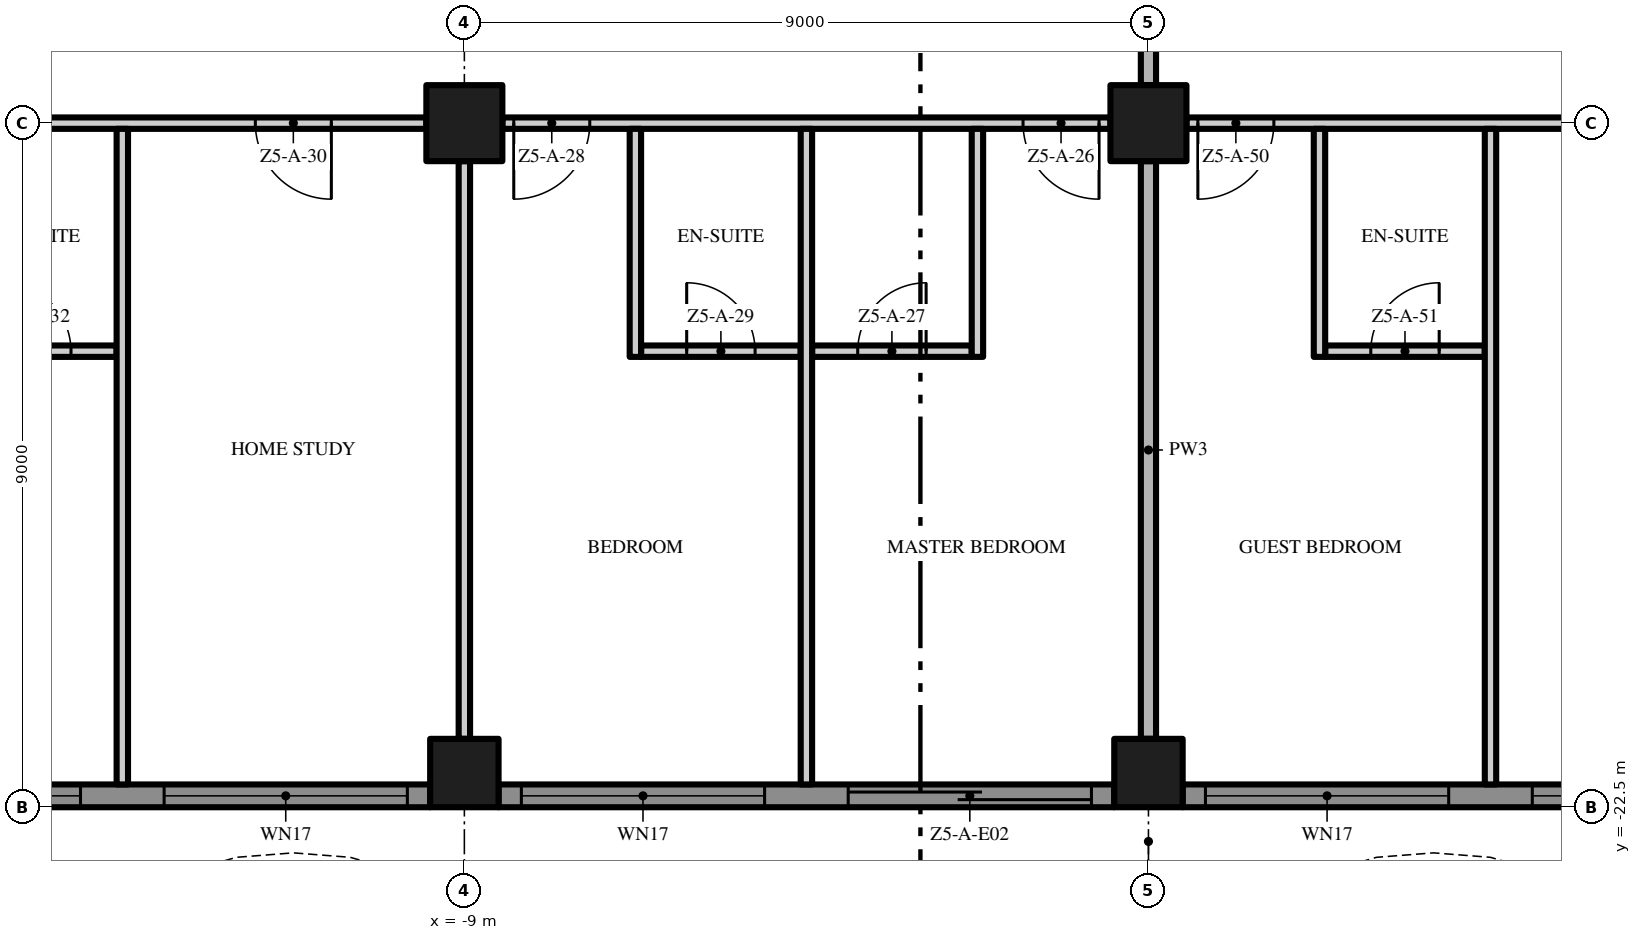
"""IFC4 building model, lengths in metres.
Left out: names, types, materials, properties, quantities, classifications, styles, units other than length and angle.
Written with IfcOpenShell. Run it as: python <this file> out.ifc"""

import sys

from ifc_helpers import new_model, si_unit, direction, frame, frame_2d, origin, origin_2d, place, context, subcontext, project, spatial, polyline, rectangle, outline, extrude, element, fill, save


model = new_model("IFC4")
c1 = context("Model", 3, precision=1e-05, world=origin(), true_north=direction((0.0, 1.0)))
c2 = subcontext(c1, "Body", "Model", "MODEL_VIEW")
j1 = project(units=[si_unit("LENGTHUNIT", "METRE"), si_unit("PLANEANGLEUNIT", "RADIAN")], contexts=[c1])
p1 = place(None, origin())
s1 = spatial("IfcSite", under=j1, at=p1, CompositionType="ELEMENT")
p2 = place(p1, origin())
s2 = spatial("IfcBuilding", under=s1, at=p2, CompositionType="ELEMENT")
p3 = place(p2, frame((0.0, 0.0, 242.6)))
s3 = spatial("IfcBuildingStorey", under=s2, at=p3, CompositionType="ELEMENT", Elevation=242.6)
p4 = place(p3, frame((-9.0, -13.5, 0.0), z_axis=(0.0, 0.0, 1.0), x_axis=(1.0, 0.0, 0.0)))
e1 = element("IfcColumn", 1, at=p4, inside=s3, PredefinedType="COLUMN", context=c2, shape_type="SweptSolid", body=[
    extrude(rectangle(XDim=1.0, YDim=1.0, at=origin_2d()), origin(), (0.0, 0.0, 1.0), 3.5),
])
p5 = place(p3, frame((-9.0, -22.05, 0.0), z_axis=(0.0, 0.0, 1.0), x_axis=(1.0, 0.0, 0.0)))
e2 = element("IfcColumn", 2, at=p5, inside=s3, PredefinedType="COLUMN", context=c2, shape_type="SweptSolid", body=[
    extrude(rectangle(XDim=0.9, YDim=0.9, at=origin_2d()), origin(), (0.0, 0.0, 1.0), 3.5),
])
p6 = place(p3, frame((0.0, -13.5, 0.0), z_axis=(0.0, 0.0, 1.0), x_axis=(1.0, 0.0, 0.0)))
e3 = element("IfcColumn", 3, at=p6, inside=s3, PredefinedType="COLUMN", context=c2, shape_type="SweptSolid", body=[
    extrude(rectangle(XDim=1.0, YDim=1.0, at=origin_2d()), origin(), (0.0, 0.0, 1.0), 3.5),
])
p7 = place(p3, frame((0.0, -22.05, 0.0), z_axis=(0.0, 0.0, 1.0), x_axis=(1.0, 0.0, 0.0)))
e4 = element("IfcColumn", 4, at=p7, inside=s3, PredefinedType="COLUMN", context=c2, shape_type="SweptSolid", body=[
    extrude(rectangle(XDim=0.9, YDim=0.9, at=origin_2d()), origin(), (0.0, 0.0, 1.0), 3.5),
])
p8 = place(p3, frame((-9.45, -22.35, 0.0), z_axis=(0.0, 0.0, 1.0), x_axis=(-1.0, 0.0, 0.0)))
e5 = element("IfcWall", 5, at=p8, inside=s3, PredefinedType="SOLIDWALL", context=c2, shape_type="SweptSolid", body=[
    extrude(rectangle(XDim=8.1, YDim=0.3, at=frame_2d((4.05, 0.0))), origin(), (0.0, 0.0, 1.0), 3.5),
])
p9 = place(p8, frame((4.6, 0.0, 0.45)))
e6 = element("IfcOpeningElement", 6, at=p9, cuts=e5, PredefinedType="OPENING", context=c2, shape_type="SweptSolid", body=[
    extrude(rectangle(XDim=3.2, YDim=2.65, at=frame_2d((1.6, 1.325))), frame((0.0, 0.16, 0.0), z_axis=(0.0, -1.0, 0.0), x_axis=(1.0, 0.0, 0.0)), (0.0, 0.0, 1.0), 0.32),
])
p10 = place(p8, frame((0.3, 0.0, 0.45)))
e7 = element("IfcOpeningElement", 7, at=p10, cuts=e5, PredefinedType="OPENING", context=c2, shape_type="SweptSolid", body=[
    extrude(rectangle(XDim=3.2, YDim=2.65, at=frame_2d((1.6, 1.325))), frame((0.0, 0.16, 0.0), z_axis=(0.0, -1.0, 0.0), x_axis=(1.0, 0.0, 0.0)), (0.0, 0.0, 1.0), 0.32),
])
p11 = place(p3, frame((-0.45, -22.35, 0.0), z_axis=(0.0, 0.0, 1.0), x_axis=(-1.0, 0.0, 0.0)))
e8 = element("IfcWall", 8, at=p11, inside=s3, PredefinedType="SOLIDWALL", context=c2, shape_type="SweptSolid", body=[
    extrude(rectangle(XDim=8.1, YDim=0.3, at=frame_2d((4.05, 0.0))), origin(), (0.0, 0.0, 1.0), 3.5),
])
p12 = place(p11, frame((4.6, 0.0, 0.45)))
e9 = element("IfcOpeningElement", 9, at=p12, cuts=e8, PredefinedType="OPENING", context=c2, shape_type="SweptSolid", body=[
    extrude(rectangle(XDim=3.2, YDim=2.65, at=frame_2d((1.6, 1.325))), frame((0.0, 0.16, 0.0), z_axis=(0.0, -1.0, 0.0), x_axis=(1.0, 0.0, 0.0)), (0.0, 0.0, 1.0), 0.32),
])
p13 = place(p11, frame((0.3, 0.0, 0.0)))
e10 = element("IfcOpeningElement", 10, at=p13, cuts=e8, PredefinedType="OPENING", context=c2, shape_type="SweptSolid", body=[
    extrude(rectangle(XDim=3.2, YDim=2.4, at=frame_2d((1.6, 1.2))), frame((0.0, 0.16, 0.0), z_axis=(0.0, -1.0, 0.0), x_axis=(1.0, 0.0, 0.0)), (0.0, 0.0, 1.0), 0.32),
])
p14 = place(p3, frame((8.55, -22.35, 0.0), z_axis=(0.0, 0.0, 1.0), x_axis=(-1.0, 0.0, 0.0)))
e11 = element("IfcWall", 11, at=p14, inside=s3, PredefinedType="SOLIDWALL", context=c2, shape_type="SweptSolid", body=[
    extrude(rectangle(XDim=8.1, YDim=0.3, at=frame_2d((4.05, 0.0))), origin(), (0.0, 0.0, 1.0), 3.5),
])
p15 = place(p14, frame((4.6, 0.0, 0.45)))
e12 = element("IfcOpeningElement", 12, at=p15, cuts=e11, PredefinedType="OPENING", context=c2, shape_type="SweptSolid", body=[
    extrude(rectangle(XDim=3.2, YDim=2.65, at=frame_2d((1.6, 1.325))), frame((0.0, 0.16, 0.0), z_axis=(0.0, -1.0, 0.0), x_axis=(1.0, 0.0, 0.0)), (0.0, 0.0, 1.0), 0.32),
])
p16 = place(p14, frame((0.3, 0.0, 0.45)))
e13 = element("IfcOpeningElement", 13, at=p16, cuts=e11, PredefinedType="OPENING", context=c2, shape_type="SweptSolid", body=[
    extrude(rectangle(XDim=3.2, YDim=2.65, at=frame_2d((1.6, 1.325))), frame((0.0, 0.16, 0.0), z_axis=(0.0, -1.0, 0.0), x_axis=(1.0, 0.0, 0.0)), (0.0, 0.0, 1.0), 0.32),
])
p17 = place(p3, origin())
e14 = element("IfcWall", 14, at=p17, inside=s3, PredefinedType="USERDEFINED", context=c2, shape_type="SweptSolid", body=[
    extrude(outline(polyline([(-22.5, -24.3), (-21.0, -25.005), (-19.5, -25.441), (-18.75, -25.5), (-18.0, -25.441), (-16.5, -25.005), (-15.0, -24.3), (-13.5, -23.595), (-12.0, -23.159), (-11.25, -23.1), (-10.5, -23.159), (-9.0, -23.595), (-7.5, -24.3), (-6.0, -25.005), (-4.5, -25.441), (-3.75, -25.5), (-3.0, -25.441), (-1.5, -25.005), (0.0, -24.3), (1.5, -23.595), (3.0, -23.159), (3.75, -23.1), (4.5, -23.159), (6.0, -23.595), (7.5, -24.3), (9.0, -25.005), (10.5, -25.441), (11.25, -25.5), (12.0, -25.441), (13.5, -25.005), (15.0, -24.3), (16.5, -23.595), (18.0, -23.159), (18.75, -23.1), (19.5, -23.159), (21.0, -23.595), (22.5, -24.3), (22.606, -24.074), (21.089, -23.36), (19.545, -22.911), (18.75, -22.849), (17.955, -22.911), (16.411, -23.36), (14.894, -24.074), (13.411, -24.771), (11.955, -25.194), (11.25, -25.249), (10.545, -25.194), (9.089, -24.771), (7.606, -24.074), (6.089, -23.36), (4.545, -22.911), (3.75, -22.849), (2.955, -22.911), (1.411, -23.36), (-0.106, -24.074), (-1.589, -24.771), (-3.045, -25.194), (-3.75, -25.249), (-4.455, -25.194), (-5.911, -24.771), (-7.394, -24.074), (-8.911, -23.36), (-10.455, -22.911), (-11.25, -22.849), (-12.045, -22.911), (-13.589, -23.36), (-15.106, -24.074), (-16.589, -24.771), (-18.045, -25.194), (-18.75, -25.249), (-19.455, -25.194), (-20.911, -24.771), (-22.394, -24.074), (-22.5, -24.3)])), origin(), (0.0, 0.0, 1.0), 0.9),
])
p18 = place(p3, frame((-15.675, -16.5, 0.0), z_axis=(0.0, 0.0, 1.0), x_axis=(1.0, 0.0, 0.0)))
e15 = element("IfcWall", 15, at=p18, inside=s3, PredefinedType="PARTITIONING", context=c2, shape_type="SweptSolid", body=[
    extrude(rectangle(XDim=2.1, YDim=0.15, at=frame_2d((1.05, 0.0))), origin(), (0.0, 0.0, 1.0), 3.5),
])
p19 = place(p18, frame((0.6, 0.0, 0.0)))
e16 = element("IfcOpeningElement", 16, at=p19, cuts=e15, PredefinedType="OPENING", context=c2, shape_type="SweptSolid", body=[
    extrude(rectangle(XDim=0.9, YDim=2.1, at=frame_2d((0.45, 1.05))), frame((0.0, 0.085, 0.0), z_axis=(0.0, -1.0, 0.0), x_axis=(1.0, 0.0, 0.0)), (0.0, 0.0, 1.0), 0.17),
])
p20 = place(p3, frame((-6.675, -16.5, 0.0), z_axis=(0.0, 0.0, 1.0), x_axis=(1.0, 0.0, 0.0)))
e17 = element("IfcWall", 17, at=p20, inside=s3, PredefinedType="PARTITIONING", context=c2, shape_type="SweptSolid", body=[
    extrude(rectangle(XDim=2.1, YDim=0.15, at=frame_2d((1.05, 0.0))), origin(), (0.0, 0.0, 1.0), 3.5),
])
p21 = place(p20, frame((0.6, 0.0, 0.0)))
e18 = element("IfcOpeningElement", 18, at=p21, cuts=e17, PredefinedType="OPENING", context=c2, shape_type="SweptSolid", body=[
    extrude(rectangle(XDim=0.9, YDim=2.1, at=frame_2d((0.45, 1.05))), frame((0.0, 0.085, 0.0), z_axis=(0.0, -1.0, 0.0), x_axis=(1.0, 0.0, 0.0)), (0.0, 0.0, 1.0), 0.17),
])
p22 = place(p3, frame((-4.425, -16.5, 0.0), z_axis=(0.0, 0.0, 1.0), x_axis=(1.0, 0.0, 0.0)))
e19 = element("IfcWall", 19, at=p22, inside=s3, PredefinedType="PARTITIONING", context=c2, shape_type="SweptSolid", body=[
    extrude(rectangle(XDim=2.1, YDim=0.15, at=frame_2d((1.05, 0.0))), origin(), (0.0, 0.0, 1.0), 3.5),
])
p23 = place(p22, frame((0.6, 0.0, 0.0)))
e20 = element("IfcOpeningElement", 20, at=p23, cuts=e19, PredefinedType="OPENING", context=c2, shape_type="SweptSolid", body=[
    extrude(rectangle(XDim=0.9, YDim=2.1, at=frame_2d((0.45, 1.05))), frame((0.0, 0.085, 0.0), z_axis=(0.0, -1.0, 0.0), x_axis=(1.0, 0.0, 0.0)), (0.0, 0.0, 1.0), 0.17),
])
p24 = place(p3, frame((2.325, -16.5, 0.0), z_axis=(0.0, 0.0, 1.0), x_axis=(1.0, 0.0, 0.0)))
e21 = element("IfcWall", 21, at=p24, inside=s3, PredefinedType="PARTITIONING", context=c2, shape_type="SweptSolid", body=[
    extrude(rectangle(XDim=2.1, YDim=0.15, at=frame_2d((1.05, 0.0))), origin(), (0.0, 0.0, 1.0), 3.5),
])
p25 = place(p24, frame((0.6, 0.0, 0.0)))
e22 = element("IfcOpeningElement", 22, at=p25, cuts=e21, PredefinedType="OPENING", context=c2, shape_type="SweptSolid", body=[
    extrude(rectangle(XDim=0.9, YDim=2.1, at=frame_2d((0.45, 1.05))), frame((0.0, 0.085, 0.0), z_axis=(0.0, -1.0, 0.0), x_axis=(1.0, 0.0, 0.0)), (0.0, 0.0, 1.0), 0.17),
])
p26 = place(p3, frame((-9.5, -13.5, 0.0), z_axis=(0.0, 0.0, 1.0), x_axis=(-1.0, 0.0, 0.0)))
e23 = element("IfcWall", 23, at=p26, inside=s3, PredefinedType="PARTITIONING", context=c2, shape_type="SweptSolid", body=[
    extrude(rectangle(XDim=8.0, YDim=0.15, at=frame_2d((4.0, 0.0))), origin(), (0.0, 0.0, 1.0), 3.5),
])
p27 = place(p26, frame((1.25, 0.0, 0.0)))
e24 = element("IfcOpeningElement", 24, at=p27, cuts=e23, PredefinedType="OPENING", context=c2, shape_type="SweptSolid", body=[
    extrude(rectangle(XDim=1.0, YDim=2.4, at=frame_2d((0.5, 1.2))), frame((0.0, 0.085, 0.0), z_axis=(0.0, -1.0, 0.0), x_axis=(1.0, 0.0, 0.0)), (0.0, 0.0, 1.0), 0.17),
])
p28 = place(p26, frame((6.85, 0.0, 0.0)))
e25 = element("IfcOpeningElement", 25, at=p28, cuts=e23, PredefinedType="OPENING", context=c2, shape_type="SweptSolid", body=[
    extrude(rectangle(XDim=1.0, YDim=2.4, at=frame_2d((0.5, 1.2))), frame((0.0, 0.085, 0.0), z_axis=(0.0, -1.0, 0.0), x_axis=(1.0, 0.0, 0.0)), (0.0, 0.0, 1.0), 0.17),
])
p29 = place(p3, frame((-0.5, -13.5, 0.0), z_axis=(0.0, 0.0, 1.0), x_axis=(-1.0, 0.0, 0.0)))
e26 = element("IfcWall", 26, at=p29, inside=s3, PredefinedType="PARTITIONING", context=c2, shape_type="SweptSolid", body=[
    extrude(rectangle(XDim=8.0, YDim=0.15, at=frame_2d((4.0, 0.0))), origin(), (0.0, 0.0, 1.0), 3.5),
])
p30 = place(p29, frame((0.15, 0.0, 0.0)))
e27 = element("IfcOpeningElement", 27, at=p30, cuts=e26, PredefinedType="OPENING", context=c2, shape_type="SweptSolid", body=[
    extrude(rectangle(XDim=1.0, YDim=2.4, at=frame_2d((0.5, 1.2))), frame((0.0, 0.085, 0.0), z_axis=(0.0, -1.0, 0.0), x_axis=(1.0, 0.0, 0.0)), (0.0, 0.0, 1.0), 0.17),
])
p31 = place(p29, frame((6.85, 0.0, 0.0)))
e28 = element("IfcOpeningElement", 28, at=p31, cuts=e26, PredefinedType="OPENING", context=c2, shape_type="SweptSolid", body=[
    extrude(rectangle(XDim=1.0, YDim=2.4, at=frame_2d((0.5, 1.2))), frame((0.0, 0.085, 0.0), z_axis=(0.0, -1.0, 0.0), x_axis=(1.0, 0.0, 0.0)), (0.0, 0.0, 1.0), 0.17),
])
p32 = place(p3, frame((8.5, -13.5, 0.0), z_axis=(0.0, 0.0, 1.0), x_axis=(-1.0, 0.0, 0.0)))
e29 = element("IfcWall", 29, at=p32, inside=s3, PredefinedType="PARTITIONING", context=c2, shape_type="SweptSolid", body=[
    extrude(rectangle(XDim=8.0, YDim=0.15, at=frame_2d((4.0, 0.0))), origin(), (0.0, 0.0, 1.0), 3.5),
])
p33 = place(p32, frame((1.25, 0.0, 0.0)))
e30 = element("IfcOpeningElement", 30, at=p33, cuts=e29, PredefinedType="OPENING", context=c2, shape_type="SweptSolid", body=[
    extrude(rectangle(XDim=1.0, YDim=2.4, at=frame_2d((0.5, 1.2))), frame((0.0, 0.085, 0.0), z_axis=(0.0, -1.0, 0.0), x_axis=(1.0, 0.0, 0.0)), (0.0, 0.0, 1.0), 0.17),
])
p34 = place(p32, frame((6.85, 0.0, 0.0)))
e31 = element("IfcOpeningElement", 31, at=p34, cuts=e29, PredefinedType="OPENING", context=c2, shape_type="SweptSolid", body=[
    extrude(rectangle(XDim=1.0, YDim=2.4, at=frame_2d((0.5, 1.2))), frame((0.0, 0.085, 0.0), z_axis=(0.0, -1.0, 0.0), x_axis=(1.0, 0.0, 0.0)), (0.0, 0.0, 1.0), 0.17),
])
p35 = place(p3, frame((-13.5, -22.2, 0.0), z_axis=(0.0, 0.0, 1.0), x_axis=(0.0, 1.0, 0.0)))
e32 = element("IfcWall", 32, at=p35, inside=s3, PredefinedType="PARTITIONING", context=c2, shape_type="SweptSolid", body=[
    extrude(rectangle(XDim=8.625, YDim=0.15, at=frame_2d((4.312, 0.0))), origin(), (0.0, 0.0, 1.0), 3.5),
])
p36 = place(p3, frame((-9.0, -21.6, 0.0), z_axis=(0.0, 0.0, 1.0), x_axis=(0.0, 1.0, 0.0)))
e33 = element("IfcWall", 33, at=p36, inside=s3, PredefinedType="PARTITIONING", context=c2, shape_type="SweptSolid", body=[
    extrude(rectangle(XDim=7.6, YDim=0.15, at=frame_2d((3.8, 0.0))), origin(), (0.0, 0.0, 1.0), 3.5),
])
p37 = place(p3, frame((-6.75, -16.575, 0.0), z_axis=(0.0, 0.0, 1.0), x_axis=(0.0, 1.0, 0.0)))
e34 = element("IfcWall", 34, at=p37, inside=s3, PredefinedType="PARTITIONING", context=c2, shape_type="SweptSolid", body=[
    extrude(rectangle(XDim=3.0, YDim=0.15, at=frame_2d((1.5, 0.0))), origin(), (0.0, 0.0, 1.0), 3.5),
])
p38 = place(p3, frame((-4.5, -22.2, 0.0), z_axis=(0.0, 0.0, 1.0), x_axis=(0.0, 1.0, 0.0)))
e35 = element("IfcWall", 35, at=p38, inside=s3, PredefinedType="PARTITIONING", context=c2, shape_type="SweptSolid", body=[
    extrude(rectangle(XDim=8.625, YDim=0.15, at=frame_2d((4.312, 0.0))), origin(), (0.0, 0.0, 1.0), 3.5),
])
p39 = place(p3, frame((-2.25, -16.575, 0.0), z_axis=(0.0, 0.0, 1.0), x_axis=(0.0, 1.0, 0.0)))
e36 = element("IfcWall", 36, at=p39, inside=s3, PredefinedType="PARTITIONING", context=c2, shape_type="SweptSolid", body=[
    extrude(rectangle(XDim=3.0, YDim=0.15, at=frame_2d((1.5, 0.0))), origin(), (0.0, 0.0, 1.0), 3.5),
])
p40 = place(p3, frame((0.0, -21.6, 0.0), z_axis=(0.0, 0.0, 1.0), x_axis=(0.0, 1.0, 0.0)))
e37 = element("IfcWall", 37, at=p40, inside=s3, PredefinedType="PARTITIONING", context=c2, shape_type="SweptSolid", body=[
    extrude(rectangle(XDim=7.6, YDim=0.2, at=frame_2d((3.8, 0.0))), origin(), (0.0, 0.0, 1.0), 3.5),
])
p41 = place(p3, frame((0.0, -13.0, 0.0), z_axis=(0.0, 0.0, 1.0), x_axis=(0.0, 1.0, 0.0)))
e38 = element("IfcWall", 38, at=p41, inside=s3, PredefinedType="PARTITIONING", context=c2, shape_type="SweptSolid", body=[
    extrude(rectangle(XDim=8.0, YDim=0.2, at=frame_2d((4.0, 0.0))), origin(), (0.0, 0.0, 1.0), 3.5),
])
p42 = place(p3, frame((2.25, -16.575, 0.0), z_axis=(0.0, 0.0, 1.0), x_axis=(0.0, 1.0, 0.0)))
e39 = element("IfcWall", 39, at=p42, inside=s3, PredefinedType="PARTITIONING", context=c2, shape_type="SweptSolid", body=[
    extrude(rectangle(XDim=3.0, YDim=0.15, at=frame_2d((1.5, 0.0))), origin(), (0.0, 0.0, 1.0), 3.5),
])
p43 = place(p3, frame((4.5, -22.2, 0.0), z_axis=(0.0, 0.0, 1.0), x_axis=(0.0, 1.0, 0.0)))
e40 = element("IfcWall", 40, at=p43, inside=s3, PredefinedType="PARTITIONING", context=c2, shape_type="SweptSolid", body=[
    extrude(rectangle(XDim=8.625, YDim=0.15, at=frame_2d((4.312, 0.0))), origin(), (0.0, 0.0, 1.0), 3.5),
])
p44 = place(p9, origin())
e41 = element("IfcWindow", 41, at=p44, inside=s3, PartitioningType="SINGLE_PANEL", PredefinedType="WINDOW", context=c2, shape_type="SweptSolid", body=[
    extrude(rectangle(XDim=3.2, YDim=2.65, at=frame_2d((1.6, 1.325))), frame((0.0, 0.03, 0.0), z_axis=(0.0, -1.0, 0.0), x_axis=(1.0, 0.0, 0.0)), (0.0, 0.0, 1.0), 0.06),
])
fill(e6, e41)
p45 = place(p10, origin())
e42 = element("IfcWindow", 42, at=p45, inside=s3, PartitioningType="SINGLE_PANEL", PredefinedType="WINDOW", context=c2, shape_type="SweptSolid", body=[
    extrude(rectangle(XDim=3.2, YDim=2.65, at=frame_2d((1.6, 1.325))), frame((0.0, 0.03, 0.0), z_axis=(0.0, -1.0, 0.0), x_axis=(1.0, 0.0, 0.0)), (0.0, 0.0, 1.0), 0.06),
])
fill(e7, e42)
p46 = place(p12, origin())
e43 = element("IfcWindow", 43, at=p46, inside=s3, PartitioningType="SINGLE_PANEL", PredefinedType="WINDOW", context=c2, shape_type="SweptSolid", body=[
    extrude(rectangle(XDim=3.2, YDim=2.65, at=frame_2d((1.6, 1.325))), frame((0.0, 0.03, 0.0), z_axis=(0.0, -1.0, 0.0), x_axis=(1.0, 0.0, 0.0)), (0.0, 0.0, 1.0), 0.06),
])
fill(e9, e43)
p47 = place(p13, origin())
e44 = element("IfcDoor", 44, at=p47, inside=s3, OperationType="SINGLE_SWING_LEFT", PredefinedType="DOOR", context=c2, shape_type="SweptSolid", body=[
    extrude(rectangle(XDim=3.2, YDim=2.4, at=frame_2d((1.6, 1.2))), frame((0.0, 0.025, 0.0), z_axis=(0.0, -1.0, 0.0), x_axis=(1.0, 0.0, 0.0)), (0.0, 0.0, 1.0), 0.05),
])
fill(e10, e44)
p48 = place(p15, origin())
e45 = element("IfcWindow", 45, at=p48, inside=s3, PartitioningType="SINGLE_PANEL", PredefinedType="WINDOW", context=c2, shape_type="SweptSolid", body=[
    extrude(rectangle(XDim=3.2, YDim=2.65, at=frame_2d((1.6, 1.325))), frame((0.0, 0.03, 0.0), z_axis=(0.0, -1.0, 0.0), x_axis=(1.0, 0.0, 0.0)), (0.0, 0.0, 1.0), 0.06),
])
fill(e12, e45)
p49 = place(p16, origin())
e46 = element("IfcWindow", 46, at=p49, inside=s3, PartitioningType="SINGLE_PANEL", PredefinedType="WINDOW", context=c2, shape_type="SweptSolid", body=[
    extrude(rectangle(XDim=3.2, YDim=2.65, at=frame_2d((1.6, 1.325))), frame((0.0, 0.03, 0.0), z_axis=(0.0, -1.0, 0.0), x_axis=(1.0, 0.0, 0.0)), (0.0, 0.0, 1.0), 0.06),
])
fill(e13, e46)
p50 = place(p30, origin())
e47 = element("IfcDoor", 47, at=p50, inside=s3, OperationType="SINGLE_SWING_LEFT", PredefinedType="DOOR", context=c2, shape_type="SweptSolid", body=[
    extrude(rectangle(XDim=1.0, YDim=2.4, at=frame_2d((0.5, 1.2))), frame((0.0, 0.025, 0.0), z_axis=(0.0, -1.0, 0.0), x_axis=(1.0, 0.0, 0.0)), (0.0, 0.0, 1.0), 0.05),
])
fill(e27, e47)
p51 = place(p23, origin())
e48 = element("IfcDoor", 48, at=p51, inside=s3, OperationType="SINGLE_SWING_RIGHT", PredefinedType="DOOR", context=c2, shape_type="SweptSolid", body=[
    extrude(rectangle(XDim=0.9, YDim=2.1, at=frame_2d((0.45, 1.05))), frame((0.0, 0.025, 0.0), z_axis=(0.0, -1.0, 0.0), x_axis=(1.0, 0.0, 0.0)), (0.0, 0.0, 1.0), 0.05),
])
fill(e20, e48)
p52 = place(p31, origin())
e49 = element("IfcDoor", 49, at=p52, inside=s3, OperationType="SINGLE_SWING_RIGHT", PredefinedType="DOOR", context=c2, shape_type="SweptSolid", body=[
    extrude(rectangle(XDim=1.0, YDim=2.4, at=frame_2d((0.5, 1.2))), frame((0.0, 0.025, 0.0), z_axis=(0.0, -1.0, 0.0), x_axis=(1.0, 0.0, 0.0)), (0.0, 0.0, 1.0), 0.05),
])
fill(e28, e49)
p53 = place(p21, origin())
e50 = element("IfcDoor", 50, at=p53, inside=s3, OperationType="SINGLE_SWING_LEFT", PredefinedType="DOOR", context=c2, shape_type="SweptSolid", body=[
    extrude(rectangle(XDim=0.9, YDim=2.1, at=frame_2d((0.45, 1.05))), frame((0.0, 0.025, 0.0), z_axis=(0.0, -1.0, 0.0), x_axis=(1.0, 0.0, 0.0)), (0.0, 0.0, 1.0), 0.05),
])
fill(e18, e50)
p54 = place(p27, origin())
e51 = element("IfcDoor", 51, at=p54, inside=s3, OperationType="SINGLE_SWING_LEFT", PredefinedType="DOOR", context=c2, shape_type="SweptSolid", body=[
    extrude(rectangle(XDim=1.0, YDim=2.4, at=frame_2d((0.5, 1.2))), frame((0.0, 0.025, 0.0), z_axis=(0.0, -1.0, 0.0), x_axis=(1.0, 0.0, 0.0)), (0.0, 0.0, 1.0), 0.05),
])
fill(e24, e51)
p55 = place(p19, origin())
e52 = element("IfcDoor", 52, at=p55, inside=s3, OperationType="SINGLE_SWING_LEFT", PredefinedType="DOOR", context=c2, shape_type="SweptSolid", body=[
    extrude(rectangle(XDim=0.9, YDim=2.1, at=frame_2d((0.45, 1.05))), frame((0.0, 0.025, 0.0), z_axis=(0.0, -1.0, 0.0), x_axis=(1.0, 0.0, 0.0)), (0.0, 0.0, 1.0), 0.05),
])
fill(e16, e52)
p56 = place(p34, origin())
e53 = element("IfcDoor", 53, at=p56, inside=s3, OperationType="SINGLE_SWING_RIGHT", PredefinedType="DOOR", context=c2, shape_type="SweptSolid", body=[
    extrude(rectangle(XDim=1.0, YDim=2.4, at=frame_2d((0.5, 1.2))), frame((0.0, 0.025, 0.0), z_axis=(0.0, -1.0, 0.0), x_axis=(1.0, 0.0, 0.0)), (0.0, 0.0, 1.0), 0.05),
])
fill(e31, e53)
p57 = place(p25, origin())
e54 = element("IfcDoor", 54, at=p57, inside=s3, OperationType="SINGLE_SWING_RIGHT", PredefinedType="DOOR", context=c2, shape_type="SweptSolid", body=[
    extrude(rectangle(XDim=0.9, YDim=2.1, at=frame_2d((0.45, 1.05))), frame((0.0, 0.025, 0.0), z_axis=(0.0, -1.0, 0.0), x_axis=(1.0, 0.0, 0.0)), (0.0, 0.0, 1.0), 0.05),
])
fill(e22, e54)
save(model, sys.argv[1])
